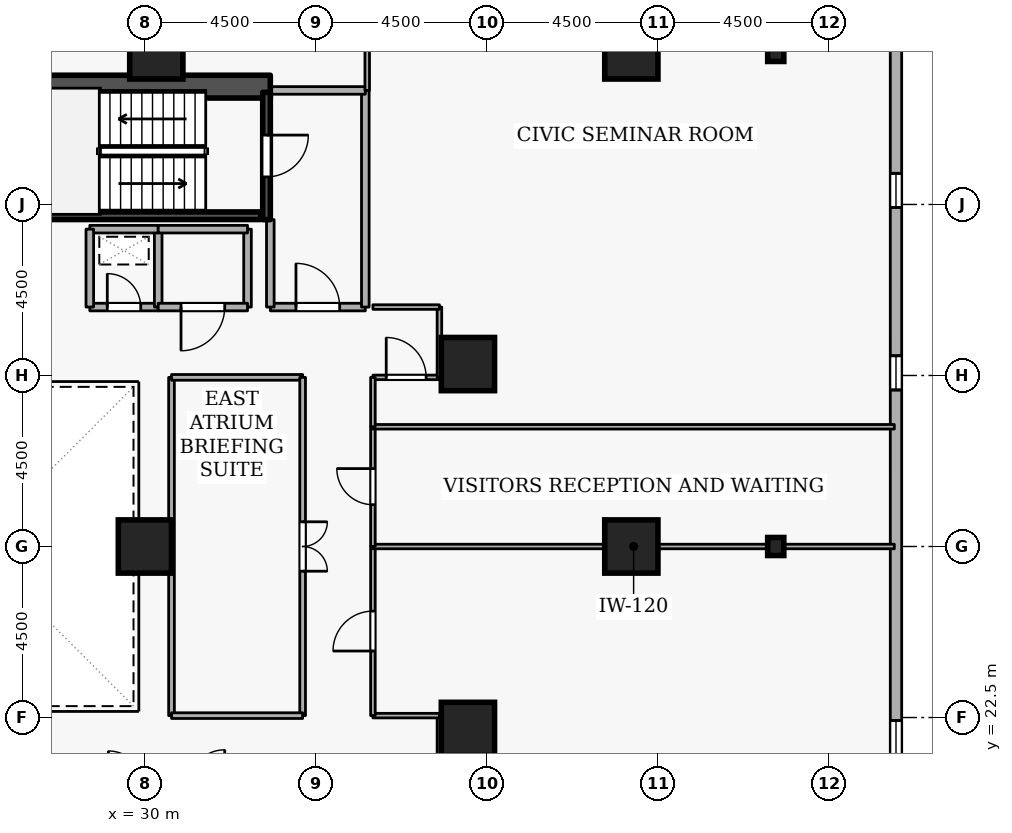
"""IFC4 building model, lengths in metres.
Left out: names, types, materials, properties, quantities, classifications, styles, units other than length and angle.
Written with IfcOpenShell. Run it as: python <this file> out.ifc"""

import sys

from ifc_helpers import new_model, si_unit, direction, frame, frame_2d, origin, origin_2d, place, context, subcontext, project, spatial, rectangle, i_section, extrude, element, fill, save


model = new_model("IFC4")
c1 = context("Model", 3, precision=1e-05, world=origin(), true_north=direction((0.0, 1.0)))
c2 = subcontext(c1, "Body", "Model", "MODEL_VIEW")
j1 = project(units=[si_unit("LENGTHUNIT", "METRE"), si_unit("PLANEANGLEUNIT", "RADIAN")], contexts=[c1])
p1 = place(None, origin())
s1 = spatial("IfcSite", under=j1, at=p1, CompositionType="ELEMENT")
p2 = place(p1, origin())
s2 = spatial("IfcBuilding", under=s1, at=p2, CompositionType="ELEMENT")
p3 = place(p2, frame((0.0, 0.0, 64.5)))
s3 = spatial("IfcBuildingStorey", under=s2, at=p3, CompositionType="ELEMENT", Elevation=64.5)
p4 = place(p3, frame((17.7, 39.1, 0.0), z_axis=(0.0, 0.0, 1.0), x_axis=(1.0, 0.0, 0.0)))
e1 = element("IfcWall", 1, at=p4, inside=s3, PredefinedType="SHEAR", context=c2, shape_type="SweptSolid", body=[
    extrude(rectangle(XDim=15.6, YDim=0.6, at=frame_2d((7.8, 0.0))), origin(), (0.0, 0.0, 1.0), 3.6),
])
for number, where, z_axis, x_axis in (
    (2, (42.8, 27.0, 0.0), (0.0, 0.0, 1.0), (1.0, 0.0, 0.0)),
    (3, (42.8, 40.0, 0.0), (0.0, 0.0, 1.0), (1.0, 0.0, 0.0)),
    (4, (38.5, 22.2, 0.0), (0.0, 0.0, 1.0), (1.0, 0.0, 0.0)),
    (5, (38.5, 31.8, 0.0), (0.0, 0.0, 1.0), (1.0, 0.0, 0.0)),
    (6, (30.3, 40.0, 0.0), (0.0, 0.0, 1.0), (1.0, 0.0, 0.0)),
    (7, (30.0, 27.0, 0.0), (0.0, 0.0, 1.0), (1.0, 0.0, 0.0)),
):
    element("IfcColumn", number, at=place(p3, frame(where, z_axis=z_axis, x_axis=x_axis)), inside=s3, PredefinedType="COLUMN", context=c2, shape_type="SweptSolid", body=[
        extrude(rectangle(XDim=1.4, YDim=1.4, at=origin_2d()), origin(), (0.0, 0.0, 1.0), 3.6),
    ])
for number, where, z_axis, x_axis in (
    (8, (46.6, 27.0, 0.0), (0.0, 0.0, 1.0), (1.0, 0.0, 0.0)),
    (9, (46.6, 40.0, 0.0), (0.0, 0.0, 1.0), (1.0, 0.0, 0.0)),
):
    element("IfcColumn", number, at=place(p3, frame(where, z_axis=z_axis, x_axis=x_axis)), inside=s3, PredefinedType="COLUMN", context=c2, shape_type="SweptSolid", body=[
        extrude(i_section(OverallWidth=0.424, OverallDepth=0.475, WebThickness=0.048, FlangeThickness=0.077, FilletRadius=0.015, at=origin_2d()), origin(), (0.0, 0.0, 1.0), 3.6),
    ])
p5 = place(p3, frame((49.765, 5.319, 0.0), z_axis=(0.0, 0.0, 1.0), x_axis=(-3.2959355e-05, 0.999999999457, 0.0)))
e10 = element("IfcWall", 10, at=p5, inside=s3, PredefinedType="STANDARD", context=c2, shape_type="SweptSolid", body=[
    extrude(rectangle(XDim=37.037, YDim=0.3, at=frame_2d((18.518, 0.0))), origin(), (0.0, 0.0, 1.0), 2.7),
])
p6 = place(p5, frame((1.8, 0.0, 0.72)))
e11 = element("IfcOpeningElement", 11, at=p6, cuts=e10, PredefinedType="OPENING", context=c2, shape_type="SweptSolid", body=[
    extrude(rectangle(XDim=0.9, YDim=1.75, at=frame_2d((0.45, 0.875))), frame((0.0, 0.16, 0.0), z_axis=(0.0, -1.0, 0.0), x_axis=(1.0, 0.0, 0.0)), (0.0, 0.0, 1.0), 0.32),
])
p7 = place(p5, frame((6.6, 0.0, 0.72)))
e12 = element("IfcOpeningElement", 12, at=p7, cuts=e10, PredefinedType="OPENING", context=c2, shape_type="SweptSolid", body=[
    extrude(rectangle(XDim=0.9, YDim=1.75, at=frame_2d((0.45, 0.875))), frame((0.0, 0.16, 0.0), z_axis=(0.0, -1.0, 0.0), x_axis=(1.0, 0.0, 0.0)), (0.0, 0.0, 1.0), 0.32),
])
p8 = place(p5, frame((11.4, 0.0, 0.72)))
e13 = element("IfcOpeningElement", 13, at=p8, cuts=e10, PredefinedType="OPENING", context=c2, shape_type="SweptSolid", body=[
    extrude(rectangle(XDim=0.9, YDim=1.75, at=frame_2d((0.45, 0.875))), frame((0.0, 0.16, 0.0), z_axis=(0.0, -1.0, 0.0), x_axis=(1.0, 0.0, 0.0)), (0.0, 0.0, 1.0), 0.32),
])
p9 = place(p5, frame((16.2, 0.0, 0.72)))
e14 = element("IfcOpeningElement", 14, at=p9, cuts=e10, PredefinedType="OPENING", context=c2, shape_type="SweptSolid", body=[
    extrude(rectangle(XDim=0.9, YDim=1.75, at=frame_2d((0.45, 0.875))), frame((0.0, 0.16, 0.0), z_axis=(0.0, -1.0, 0.0), x_axis=(1.0, 0.0, 0.0)), (0.0, 0.0, 1.0), 0.32),
])
p10 = place(p5, frame((25.8, 0.0, 0.72)))
e15 = element("IfcOpeningElement", 15, at=p10, cuts=e10, PredefinedType="OPENING", context=c2, shape_type="SweptSolid", body=[
    extrude(rectangle(XDim=0.9, YDim=1.75, at=frame_2d((0.45, 0.875))), frame((0.0, 0.16, 0.0), z_axis=(0.0, -1.0, 0.0), x_axis=(1.0, 0.0, 0.0)), (0.0, 0.0, 1.0), 0.32),
])
p11 = place(p5, frame((30.6, 0.0, 0.72)))
e16 = element("IfcOpeningElement", 16, at=p11, cuts=e10, PredefinedType="OPENING", context=c2, shape_type="SweptSolid", body=[
    extrude(rectangle(XDim=0.9, YDim=1.75, at=frame_2d((0.45, 0.875))), frame((0.0, 0.16, 0.0), z_axis=(0.0, -1.0, 0.0), x_axis=(1.0, 0.0, 0.0)), (0.0, 0.0, 1.0), 0.32),
])
p12 = place(p3, frame((33.2, 38.95, 0.0), z_axis=(0.0, 0.0, 1.0), x_axis=(0.0, -1.0, 0.0)))
e17 = element("IfcWall", 17, at=p12, inside=s3, PredefinedType="SHEAR", context=c2, shape_type="SweptSolid", body=[
    extrude(rectangle(XDim=3.35, YDim=0.2, at=frame_2d((1.675, 0.0))), origin(), (0.0, 0.0, 1.0), 3.6),
])
p13 = place(p12, frame((1.125, 0.0, 0.0)))
e18 = element("IfcOpeningElement", 18, at=p13, cuts=e17, PredefinedType="OPENING", context=c2, shape_type="SweptSolid", body=[
    extrude(rectangle(XDim=1.1, YDim=2.1, at=frame_2d((0.55, 1.05))), frame((0.0, 0.11, 0.0), z_axis=(0.0, -1.0, 0.0), x_axis=(1.0, 0.0, 0.0)), (0.0, 0.0, 1.0), 0.22),
])
p14 = place(p3, frame((25.95, 35.703, 0.0), z_axis=(0.0, 0.0, 1.0), x_axis=(1.0, 0.0, 0.0)))
e19 = element("IfcWall", 19, at=p14, inside=s3, PredefinedType="SHEAR", context=c2, shape_type="SweptSolid", body=[
    extrude(rectangle(XDim=7.1, YDim=0.2, at=frame_2d((3.55, 0.0))), origin(), (0.0, 0.0, 1.0), 3.6),
])
p15 = place(p3, frame((33.3, 33.3, 0.0), z_axis=(0.0, 0.0, 1.0), x_axis=(1.0, 0.0, 0.0)))
e20 = element("IfcWall", 20, at=p15, inside=s3, PredefinedType="STANDARD", context=c2, shape_type="SweptSolid", body=[
    extrude(rectangle(XDim=2.5, YDim=0.2, at=frame_2d((1.25, 0.0))), origin(), (0.0, 0.0, 1.0), 3.34),
])
p16 = place(p15, frame((0.675, 0.0, 0.0)))
e21 = element("IfcOpeningElement", 21, at=p16, cuts=e20, PredefinedType="OPENING", context=c2, shape_type="SweptSolid", body=[
    extrude(rectangle(XDim=1.15, YDim=2.1, at=frame_2d((0.575, 1.05))), frame((0.0, 0.11, 0.0), z_axis=(0.0, -1.0, 0.0), x_axis=(1.0, 0.0, 0.0)), (0.0, 0.0, 1.0), 0.22),
])
p17 = place(p3, frame((35.8, 33.3, 0.0), z_axis=(0.0, 0.0, 1.0), x_axis=(0.0, 1.0, 0.0)))
e22 = element("IfcWall", 22, at=p17, inside=s3, PredefinedType="STANDARD", context=c2, shape_type="SweptSolid", body=[
    extrude(rectangle(XDim=5.7, YDim=0.2, at=frame_2d((2.85, 0.0))), origin(), (0.0, 0.0, 1.0), 3.34),
])
p18 = place(p3, frame((35.8, 39.0, 0.0), z_axis=(0.0, 0.0, 1.0), x_axis=(-1.0, 0.0, 0.0)))
e23 = element("IfcWall", 23, at=p18, inside=s3, PredefinedType="STANDARD", context=c2, shape_type="SweptSolid", body=[
    extrude(rectangle(XDim=2.5, YDim=0.2, at=frame_2d((1.25, 0.0))), origin(), (0.0, 0.0, 1.0), 3.34),
])
p19 = place(p3, frame((33.3, 35.6, 0.0), z_axis=(0.0, 0.0, 1.0), x_axis=(0.0, -1.0, 0.0)))
e24 = element("IfcWall", 24, at=p19, inside=s3, PredefinedType="STANDARD", context=c2, shape_type="SweptSolid", body=[
    extrude(rectangle(XDim=2.3, YDim=0.2, at=frame_2d((1.15, 0.0))), origin(), (0.0, 0.0, 1.0), 2.545),
])
p20 = place(p3, frame((28.55, 33.3, 0.0), z_axis=(0.0, 0.0, 1.0), x_axis=(1.0, 0.0, 0.0)))
e25 = element("IfcWall", 25, at=p20, inside=s3, PredefinedType="STANDARD", context=c2, shape_type="SweptSolid", body=[
    extrude(rectangle(XDim=1.8, YDim=0.2, at=frame_2d((0.9, 0.0))), origin(), (0.0, 0.0, 1.0), 3.34),
])
p21 = place(p20, frame((0.46, 0.0, 0.0)))
e26 = element("IfcOpeningElement", 26, at=p21, cuts=e25, PredefinedType="OPENING", context=c2, shape_type="SweptSolid", body=[
    extrude(rectangle(XDim=0.88, YDim=2.04, at=frame_2d((0.44, 1.02))), frame((0.0, 0.11, 0.0), z_axis=(0.0, -1.0, 0.0), x_axis=(1.0, 0.0, 0.0)), (0.0, 0.0, 1.0), 0.22),
])
p22 = place(p3, frame((30.35, 33.3, 0.0), z_axis=(0.0, 0.0, 1.0), x_axis=(0.0, 1.0, 0.0)))
e27 = element("IfcWall", 27, at=p22, inside=s3, PredefinedType="STANDARD", context=c2, shape_type="SweptSolid", body=[
    extrude(rectangle(XDim=2.05, YDim=0.2, at=frame_2d((1.025, 0.0))), origin(), (0.0, 0.0, 1.0), 3.34),
])
p23 = place(p3, frame((30.35, 35.35, 0.0), z_axis=(0.0, 0.0, 1.0), x_axis=(-1.0, 0.0, 0.0)))
e28 = element("IfcWall", 28, at=p23, inside=s3, PredefinedType="STANDARD", context=c2, shape_type="SweptSolid", body=[
    extrude(rectangle(XDim=1.8, YDim=0.2, at=frame_2d((0.9, 0.0))), origin(), (0.0, 0.0, 1.0), 3.34),
])
p24 = place(p3, frame((28.55, 35.35, 0.0), z_axis=(0.0, 0.0, 1.0), x_axis=(0.0, -1.0, 0.0)))
e29 = element("IfcWall", 29, at=p24, inside=s3, PredefinedType="STANDARD", context=c2, shape_type="SweptSolid", body=[
    extrude(rectangle(XDim=2.05, YDim=0.2, at=frame_2d((1.025, 0.0))), origin(), (0.0, 0.0, 1.0), 3.34),
])
p25 = place(p3, frame((32.7, 35.35, 0.0), z_axis=(0.0, 0.0, 1.0), x_axis=(0.0, -1.0, 0.0)))
e30 = element("IfcWall", 30, at=p25, inside=s3, PredefinedType="STANDARD", context=c2, shape_type="SweptSolid", body=[
    extrude(rectangle(XDim=2.05, YDim=0.2, at=frame_2d((1.025, 0.0))), origin(), (0.0, 0.0, 1.0), 2.545),
])
p26 = place(p3, frame((32.7, 33.3, 0.0), z_axis=(0.0, 0.0, 1.0), x_axis=(-1.0, 0.0, 0.0)))
e31 = element("IfcWall", 31, at=p26, inside=s3, PredefinedType="STANDARD", context=c2, shape_type="SweptSolid", body=[
    extrude(rectangle(XDim=2.35, YDim=0.2, at=frame_2d((1.175, 0.0))), origin(), (0.0, 0.0, 1.0), 3.34),
])
p27 = place(p26, frame((0.6, 0.0, 0.0)))
e32 = element("IfcOpeningElement", 32, at=p27, cuts=e31, PredefinedType="OPENING", context=c2, shape_type="SweptSolid", body=[
    extrude(rectangle(XDim=1.15, YDim=2.1, at=frame_2d((0.575, 1.05))), frame((0.0, 0.11, 0.0), z_axis=(0.0, -1.0, 0.0), x_axis=(1.0, 0.0, 0.0)), (0.0, 0.0, 1.0), 0.22),
])
p28 = place(p3, frame((30.35, 35.35, 0.0), z_axis=(0.0, 0.0, 1.0), x_axis=(1.0, 0.0, 0.0)))
e33 = element("IfcWall", 33, at=p28, inside=s3, PredefinedType="STANDARD", context=c2, shape_type="SweptSolid", body=[
    extrude(rectangle(XDim=2.35, YDim=0.2, at=frame_2d((1.175, 0.0))), origin(), (0.0, 0.0, 1.0), 3.34),
])
p29 = place(p3, frame((37.75, 20.7, 0.0), z_axis=(0.0, 0.0, 1.0), x_axis=(0.0, 1.0, 0.0)))
e34 = element("IfcWall", 34, at=p29, inside=s3, PredefinedType="PARTITIONING", context=c2, shape_type="SweptSolid", body=[
    extrude(rectangle(XDim=1.85, YDim=0.12, at=frame_2d((0.925, 0.0))), origin(), (0.0, 0.0, 1.0), 3.34),
])
p30 = place(p3, frame((37.75, 22.55, 0.0), z_axis=(0.0, 0.0, 1.0), x_axis=(-1.0, 0.0, 0.0)))
e35 = element("IfcWall", 35, at=p30, inside=s3, PredefinedType="PARTITIONING", context=c2, shape_type="SweptSolid", body=[
    extrude(rectangle(XDim=1.75, YDim=0.12, at=frame_2d((0.875, 0.0))), origin(), (0.0, 0.0, 1.0), 3.34),
])
p31 = place(p3, frame((36.0, 22.55, 0.0), z_axis=(0.0, 0.0, 1.0), x_axis=(0.0, 1.0, 0.0)))
e36 = element("IfcWall", 36, at=p31, inside=s3, PredefinedType="PARTITIONING", context=c2, shape_type="SweptSolid", body=[
    extrude(rectangle(XDim=4.45, YDim=0.12, at=frame_2d((2.225, 0.0))), origin(), (0.0, 0.0, 1.0), 3.34),
])
p32 = place(p31, frame((1.7, 0.0, 0.0)))
e37 = element("IfcOpeningElement", 37, at=p32, cuts=e36, PredefinedType="OPENING", context=c2, shape_type="SweptSolid", body=[
    extrude(rectangle(XDim=1.05, YDim=2.1, at=frame_2d((0.525, 1.05))), frame((0.0, 0.07, 0.0), z_axis=(0.0, -1.0, 0.0), x_axis=(1.0, 0.0, 0.0)), (0.0, 0.0, 1.0), 0.14),
])
p33 = place(p3, frame((36.0, 27.0, 0.0), z_axis=(0.0, 0.0, 1.0), x_axis=(1.0, 0.0, 0.0)))
e38 = element("IfcWall", 38, at=p33, inside=s3, PredefinedType="PARTITIONING", context=c2, shape_type="SweptSolid", body=[
    extrude(rectangle(XDim=13.72, YDim=0.12, at=frame_2d((6.86, 0.0))), origin(), (0.0, 0.0, 1.0), 2.878),
])
p34 = place(p3, frame((36.0, 27.0, 0.0), z_axis=(0.0, 0.0, 1.0), x_axis=(0.0, 1.0, 0.0)))
e39 = element("IfcWall", 39, at=p34, inside=s3, PredefinedType="PARTITIONING", context=c2, shape_type="SweptSolid", body=[
    extrude(rectangle(XDim=3.15, YDim=0.12, at=frame_2d((1.575, 0.0))), origin(), (0.0, 0.0, 1.0), 3.34),
])
p35 = place(p34, frame((1.1, 0.0, 0.0)))
e40 = element("IfcOpeningElement", 40, at=p35, cuts=e39, PredefinedType="OPENING", context=c2, shape_type="SweptSolid", body=[
    extrude(rectangle(XDim=0.95, YDim=2.1, at=frame_2d((0.475, 1.05))), frame((0.0, 0.07, 0.0), z_axis=(0.0, -1.0, 0.0), x_axis=(1.0, 0.0, 0.0)), (0.0, 0.0, 1.0), 0.14),
])
p36 = place(p3, frame((36.0, 30.15, 0.0), z_axis=(0.0, 0.0, 1.0), x_axis=(1.0, 0.0, 0.0)))
e41 = element("IfcWall", 41, at=p36, inside=s3, PredefinedType="PARTITIONING", context=c2, shape_type="SweptSolid", body=[
    extrude(rectangle(XDim=13.72, YDim=0.12, at=frame_2d((6.86, 0.0))), origin(), (0.0, 0.0, 1.0), 3.34),
])
p37 = place(p3, frame((36.0, 31.45, 0.0), z_axis=(0.0, 0.0, 1.0), x_axis=(1.0, 0.0, 0.0)))
e42 = element("IfcWall", 42, at=p37, inside=s3, PredefinedType="PARTITIONING", context=c2, shape_type="SweptSolid", body=[
    extrude(rectangle(XDim=1.75, YDim=0.12, at=frame_2d((0.875, 0.0))), origin(), (0.0, 0.0, 1.0), 3.34),
])
p38 = place(p37, frame((0.35, 0.0, 0.0)))
e43 = element("IfcOpeningElement", 43, at=p38, cuts=e42, PredefinedType="OPENING", context=c2, shape_type="SweptSolid", body=[
    extrude(rectangle(XDim=1.05, YDim=2.1, at=frame_2d((0.525, 1.05))), frame((0.0, 0.07, 0.0), z_axis=(0.0, -1.0, 0.0), x_axis=(1.0, 0.0, 0.0)), (0.0, 0.0, 1.0), 0.14),
])
p39 = place(p3, frame((37.75, 31.45, 0.0), z_axis=(0.0, 0.0, 1.0), x_axis=(0.0, 1.0, 0.0)))
e44 = element("IfcWall", 44, at=p39, inside=s3, PredefinedType="PARTITIONING", context=c2, shape_type="SweptSolid", body=[
    extrude(rectangle(XDim=1.85, YDim=0.12, at=frame_2d((0.925, 0.0))), origin(), (0.0, 0.0, 1.0), 3.34),
])
p40 = place(p3, frame((37.75, 33.3, 0.0), z_axis=(0.0, 0.0, 1.0), x_axis=(-1.0, 0.0, 0.0)))
e45 = element("IfcWall", 45, at=p40, inside=s3, PredefinedType="PARTITIONING", context=c2, shape_type="SweptSolid", body=[
    extrude(rectangle(XDim=1.75, YDim=0.12, at=frame_2d((0.875, 0.0))), origin(), (0.0, 0.0, 1.0), 3.34),
])
p41 = place(p3, frame((35.85, 39.0, 0.0), z_axis=(0.0, 0.0, 1.0), x_axis=(0.0, 1.0, 0.0)))
e46 = element("IfcWall", 46, at=p41, inside=s3, PredefinedType="PARTITIONING", context=c2, shape_type="SweptSolid", body=[
    extrude(rectangle(XDim=6.22, YDim=0.12, at=frame_2d((3.11, 0.0))), origin(), (0.0, 0.0, 1.0), 3.34),
])
p42 = place(p3, frame((36.0, 30.15, 0.0), z_axis=(0.0, 0.0, 1.0), x_axis=(0.0, 1.0, 0.0)))
e47 = element("IfcWall", 47, at=p42, inside=s3, PredefinedType="PARTITIONING", context=c2, shape_type="SweptSolid", body=[
    extrude(rectangle(XDim=1.3, YDim=0.12, at=frame_2d((0.65, 0.0))), origin(), (0.0, 0.0, 1.0), 3.34),
])
p43 = place(p3, frame((30.7, 22.55, 0.0), z_axis=(0.0, 0.0, 1.0), x_axis=(0.0, 1.0, 0.0)))
e48 = element("IfcWall", 48, at=p43, inside=s3, PredefinedType="PARTITIONING", context=c2, shape_type="SweptSolid", body=[
    extrude(rectangle(XDim=8.9, YDim=0.15, at=frame_2d((4.45, 0.0))), origin(), (0.0, 0.0, 1.0), 3.34),
])
p44 = place(p3, frame((30.7, 31.45, 0.0), z_axis=(0.0, 0.0, 1.0), x_axis=(1.0, 0.0, 0.0)))
e49 = element("IfcWall", 49, at=p44, inside=s3, PredefinedType="PARTITIONING", context=c2, shape_type="SweptSolid", body=[
    extrude(rectangle(XDim=3.45, YDim=0.15, at=frame_2d((1.725, 0.0))), origin(), (0.0, 0.0, 1.0), 3.34),
])
p45 = place(p3, frame((34.15, 31.45, 0.0), z_axis=(0.0, 0.0, 1.0), x_axis=(0.0, -1.0, 0.0)))
e50 = element("IfcWall", 50, at=p45, inside=s3, PredefinedType="PARTITIONING", context=c2, shape_type="SweptSolid", body=[
    extrude(rectangle(XDim=8.9, YDim=0.15, at=frame_2d((4.45, 0.0))), origin(), (0.0, 0.0, 1.0), 3.34),
])
p46 = place(p45, frame((3.8, 0.0, 0.0)))
e51 = element("IfcOpeningElement", 51, at=p46, cuts=e50, PredefinedType="OPENING", context=c2, shape_type="SweptSolid", body=[
    extrude(rectangle(XDim=1.3, YDim=2.12, at=frame_2d((0.65, 1.06))), frame((0.0, 0.085, 0.0), z_axis=(0.0, -1.0, 0.0), x_axis=(1.0, 0.0, 0.0)), (0.0, 0.0, 1.0), 0.17),
])
p47 = place(p3, frame((34.15, 22.55, 0.0), z_axis=(0.0, 0.0, 1.0), x_axis=(-1.0, 0.0, 0.0)))
e52 = element("IfcWall", 52, at=p47, inside=s3, PredefinedType="PARTITIONING", context=c2, shape_type="SweptSolid", body=[
    extrude(rectangle(XDim=3.45, YDim=0.15, at=frame_2d((1.725, 0.0))), origin(), (0.0, 0.0, 1.0), 3.34),
])
p48 = place(p9, origin())
e53 = element("IfcWindow", 53, at=p48, inside=s3, PartitioningType="SINGLE_PANEL", PredefinedType="WINDOW", context=c2, shape_type="SweptSolid", body=[
    extrude(rectangle(XDim=0.9, YDim=1.75, at=frame_2d((0.45, 0.875))), frame((0.0, 0.03, 0.0), z_axis=(0.0, -1.0, 0.0), x_axis=(1.0, 0.0, 0.0)), (0.0, 0.0, 1.0), 0.06),
])
fill(e14, e53)
p49 = place(p10, origin())
e54 = element("IfcWindow", 54, at=p49, inside=s3, PartitioningType="SINGLE_PANEL", PredefinedType="WINDOW", context=c2, shape_type="SweptSolid", body=[
    extrude(rectangle(XDim=0.9, YDim=1.75, at=frame_2d((0.45, 0.875))), frame((0.0, 0.03, 0.0), z_axis=(0.0, -1.0, 0.0), x_axis=(1.0, 0.0, 0.0)), (0.0, 0.0, 1.0), 0.06),
])
fill(e15, e54)
p50 = place(p11, origin())
e55 = element("IfcWindow", 55, at=p50, inside=s3, PartitioningType="SINGLE_PANEL", PredefinedType="WINDOW", context=c2, shape_type="SweptSolid", body=[
    extrude(rectangle(XDim=0.9, YDim=1.75, at=frame_2d((0.45, 0.875))), frame((0.0, 0.03, 0.0), z_axis=(0.0, -1.0, 0.0), x_axis=(1.0, 0.0, 0.0)), (0.0, 0.0, 1.0), 0.06),
])
fill(e16, e55)
p51 = place(p13, origin())
e56 = element("IfcDoor", 56, at=p51, inside=s3, OperationType="SINGLE_SWING_LEFT", PredefinedType="DOOR", context=c2, shape_type="SweptSolid", body=[
    extrude(rectangle(XDim=1.1, YDim=2.1, at=frame_2d((0.55, 1.05))), frame((0.0, 0.025, 0.0), z_axis=(0.0, -1.0, 0.0), x_axis=(1.0, 0.0, 0.0)), (0.0, 0.0, 1.0), 0.05),
])
fill(e18, e56)
p52 = place(p16, origin())
e57 = element("IfcDoor", 57, at=p52, inside=s3, OperationType="SINGLE_SWING_LEFT", PredefinedType="DOOR", context=c2, shape_type="SweptSolid", body=[
    extrude(rectangle(XDim=1.15, YDim=2.1, at=frame_2d((0.575, 1.05))), frame((0.0, 0.025, 0.0), z_axis=(0.0, -1.0, 0.0), x_axis=(1.0, 0.0, 0.0)), (0.0, 0.0, 1.0), 0.05),
])
fill(e21, e57)
p53 = place(p21, origin())
e58 = element("IfcDoor", 58, at=p53, inside=s3, OperationType="SINGLE_SWING_LEFT", PredefinedType="DOOR", context=c2, shape_type="SweptSolid", body=[
    extrude(rectangle(XDim=0.88, YDim=2.04, at=frame_2d((0.44, 1.02))), frame((0.0, 0.025, 0.0), z_axis=(0.0, -1.0, 0.0), x_axis=(1.0, 0.0, 0.0)), (0.0, 0.0, 1.0), 0.05),
])
fill(e26, e58)
p54 = place(p27, origin())
e59 = element("IfcDoor", 59, at=p54, inside=s3, OperationType="SINGLE_SWING_RIGHT", PredefinedType="DOOR", context=c2, shape_type="SweptSolid", body=[
    extrude(rectangle(XDim=1.15, YDim=2.1, at=frame_2d((0.575, 1.05))), frame((0.0, 0.025, 0.0), z_axis=(0.0, -1.0, 0.0), x_axis=(1.0, 0.0, 0.0)), (0.0, 0.0, 1.0), 0.05),
])
fill(e32, e59)
p55 = place(p32, origin())
e60 = element("IfcDoor", 60, at=p55, inside=s3, OperationType="SINGLE_SWING_LEFT", PredefinedType="DOOR", context=c2, shape_type="SweptSolid", body=[
    extrude(rectangle(XDim=1.05, YDim=2.1, at=frame_2d((0.525, 1.05))), frame((0.0, 0.025, 0.0), z_axis=(0.0, -1.0, 0.0), x_axis=(1.0, 0.0, 0.0)), (0.0, 0.0, 1.0), 0.05),
])
fill(e37, e60)
p56 = place(p35, origin())
e61 = element("IfcDoor", 61, at=p56, inside=s3, OperationType="SINGLE_SWING_RIGHT", PredefinedType="DOOR", context=c2, shape_type="SweptSolid", body=[
    extrude(rectangle(XDim=0.95, YDim=2.1, at=frame_2d((0.475, 1.05))), frame((0.0, 0.025, 0.0), z_axis=(0.0, -1.0, 0.0), x_axis=(1.0, 0.0, 0.0)), (0.0, 0.0, 1.0), 0.05),
])
fill(e40, e61)
p57 = place(p38, origin())
e62 = element("IfcDoor", 62, at=p57, inside=s3, OperationType="SINGLE_SWING_LEFT", PredefinedType="DOOR", context=c2, shape_type="SweptSolid", body=[
    extrude(rectangle(XDim=1.05, YDim=2.1, at=frame_2d((0.525, 1.05))), frame((0.0, 0.025, 0.0), z_axis=(0.0, -1.0, 0.0), x_axis=(1.0, 0.0, 0.0)), (0.0, 0.0, 1.0), 0.05),
])
fill(e43, e62)
p58 = place(p46, origin())
e63 = element("IfcDoor", 63, at=p58, inside=s3, OperationType="DOUBLE_DOOR_SINGLE_SWING", PredefinedType="DOOR", context=c2, shape_type="SweptSolid", body=[
    extrude(rectangle(XDim=1.3, YDim=2.12, at=frame_2d((0.65, 1.06))), frame((0.0, 0.025, 0.0), z_axis=(0.0, -1.0, 0.0), x_axis=(1.0, 0.0, 0.0)), (0.0, 0.0, 1.0), 0.05),
])
fill(e51, e63)
save(model, sys.argv[1])
